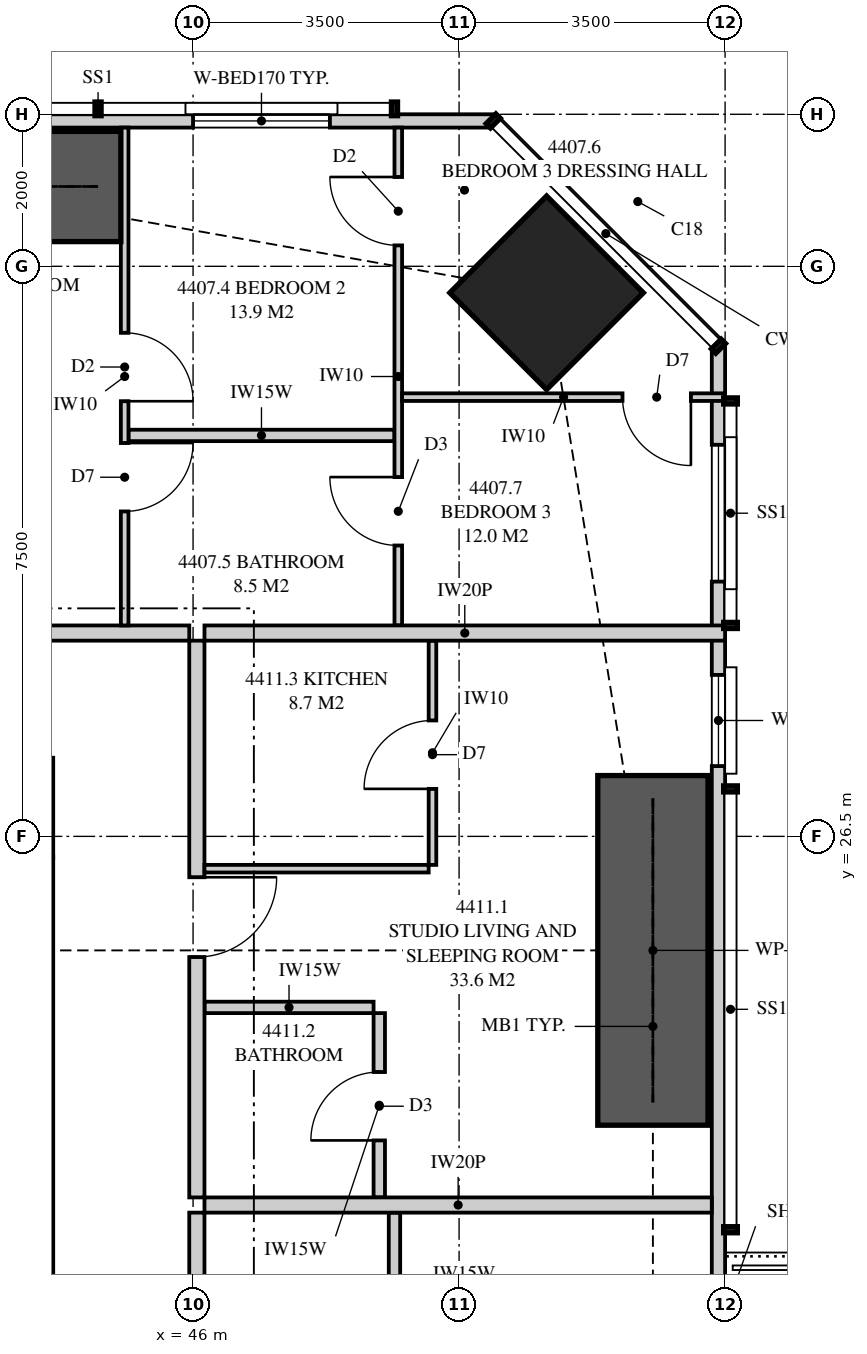
"""IFC4 building model, lengths in metres.
Left out: names, types, materials, properties, quantities, classifications, styles, units other than length and angle.
Written with IfcOpenShell. Run it as: python <this file> out.ifc"""

import sys

from ifc_helpers import new_model, si_unit, direction, frame, frame_2d, origin, origin_2d, place, context, subcontext, project, spatial, polyline, rectangle, outline, extrude, element, fill, save


model = new_model("IFC4")
c1 = context("Model", 3, precision=1e-05, world=origin(), true_north=direction((0.0, 1.0)))
c2 = subcontext(c1, "Body", "Model", "MODEL_VIEW")
j1 = project(units=[si_unit("LENGTHUNIT", "METRE"), si_unit("PLANEANGLEUNIT", "RADIAN")], contexts=[c1])
p1 = place(None, origin())
s1 = spatial("IfcSite", under=j1, at=p1, CompositionType="ELEMENT")
p2 = place(p1, origin())
s2 = spatial("IfcBuilding", under=s1, at=p2, CompositionType="ELEMENT")
p3 = place(p2, frame((0.0, 0.0, 164.4)))
s3 = spatial("IfcBuildingStorey", under=s2, at=p3, CompositionType="ELEMENT", Elevation=164.4)
p4 = place(p3, frame((50.652, 33.652, 0.0), z_axis=(0.0, 0.0, 1.0), x_axis=(0.707106781187, 0.707106781187, 0.0)))
e1 = element("IfcColumn", 1, at=p4, inside=s3, PredefinedType="COLUMN", context=c2, shape_type="SweptSolid", body=[
    extrude(rectangle(XDim=1.8, YDim=1.8, at=origin_2d()), origin(), (0.0, 0.0, 1.0), 3.35),
])
p5 = place(p3, frame((43.8, 19.3, 0.0), z_axis=(0.0, 0.0, 1.0), x_axis=(0.0, 1.0, 0.0)))
e2 = element("IfcWall", 2, at=p5, inside=s3, PredefinedType="SHEAR", context=c2, shape_type="SweptSolid", body=[
    extrude(rectangle(XDim=6.925, YDim=0.7, at=frame_2d((3.462, 0.0))), origin(), (0.0, 0.0, 1.0), 3.35),
])
p6 = place(p3, frame((52.913, 3.051, 0.0), z_axis=(0.0, 0.0, 1.0), x_axis=(0.0, 1.0, 0.0)))
e3 = element("IfcWall", 3, at=p6, inside=s3, PredefinedType="SOLIDWALL", context=c2, shape_type="SweptSolid", body=[
    extrude(outline(polyline([(0.0, 0.0), (29.897, 0.0), (29.897, 3.11), (22.167, 3.11), (22.167, 2.15), (22.074, 2.15), (22.074, 3.11), (21.949, 3.11), (21.949, 2.15), (9.949, 2.15), (9.949, 3.11), (9.847, 3.11), (9.847, 2.15), (9.706, 2.15), (9.706, 3.11), (0.0, 3.11), (0.0, 0.0)])), frame((0.0, 0.087, 0.0), z_axis=(0.0, -1.0, 0.0), x_axis=(1.0, 0.0, 0.0)), (0.0, 0.0, 1.0), 0.175),
])
p7 = place(p6, frame((1.797, 0.0, 0.4)))
e4 = element("IfcOpeningElement", 4, at=p7, cuts=e3, PredefinedType="OPENING", context=c2, shape_type="SweptSolid", body=[
    extrude(rectangle(XDim=1.8, YDim=1.7, at=frame_2d((0.9, 0.85))), frame((0.0, 0.097, 0.0), z_axis=(0.0, -1.0, 0.0), x_axis=(1.0, 0.0, 0.0)), (0.0, 0.0, 1.0), 0.195),
])
p8 = place(p6, frame((5.674, 0.0, 0.4)))
e5 = element("IfcOpeningElement", 5, at=p8, cuts=e3, PredefinedType="OPENING", context=c2, shape_type="SweptSolid", body=[
    extrude(rectangle(XDim=1.8, YDim=1.7, at=frame_2d((0.9, 0.85))), frame((0.0, 0.097, 0.0), z_axis=(0.0, -1.0, 0.0), x_axis=(1.0, 0.0, 0.0)), (0.0, 0.0, 1.0), 0.195),
])
p9 = place(p6, frame((12.349, 0.0, 0.4)))
e6 = element("IfcOpeningElement", 6, at=p9, cuts=e3, PredefinedType="OPENING", context=c2, shape_type="SweptSolid", body=[
    extrude(rectangle(XDim=2.4, YDim=1.7, at=frame_2d((1.2, 0.85))), frame((0.0, 0.097, 0.0), z_axis=(0.0, -1.0, 0.0), x_axis=(1.0, 0.0, 0.0)), (0.0, 0.0, 1.0), 0.195),
])
p10 = place(p6, frame((15.274, 0.0, 0.0)))
e7 = element("IfcOpeningElement", 7, at=p10, cuts=e3, PredefinedType="OPENING", context=c2, shape_type="SweptSolid", body=[
    extrude(rectangle(XDim=1.8, YDim=2.1, at=frame_2d((0.9, 1.05))), frame((0.0, 0.097, 0.0), z_axis=(0.0, -1.0, 0.0), x_axis=(1.0, 0.0, 0.0)), (0.0, 0.0, 1.0), 0.195),
])
p11 = place(p6, frame((24.373, 0.0, 0.4)))
e8 = element("IfcOpeningElement", 8, at=p11, cuts=e3, PredefinedType="OPENING", context=c2, shape_type="SweptSolid", body=[
    extrude(rectangle(XDim=1.2, YDim=1.7, at=frame_2d((0.6, 0.85))), frame((0.0, 0.097, 0.0), z_axis=(0.0, -1.0, 0.0), x_axis=(1.0, 0.0, 0.0)), (0.0, 0.0, 1.0), 0.195),
])
p12 = place(p6, frame((26.801, 0.0, 0.4)))
e9 = element("IfcOpeningElement", 9, at=p12, cuts=e3, PredefinedType="OPENING", context=c2, shape_type="SweptSolid", body=[
    extrude(rectangle(XDim=1.8, YDim=1.7, at=frame_2d((0.9, 0.85))), frame((0.0, 0.097, 0.0), z_axis=(0.0, -1.0, 0.0), x_axis=(1.0, 0.0, 0.0)), (0.0, 0.0, 1.0), 0.195),
])
p13 = place(p3, frame((49.949, 35.913, 0.0), z_axis=(0.0, 0.0, 1.0), x_axis=(-1.0, 0.0, 0.0)))
e10 = element("IfcWall", 10, at=p13, inside=s3, PredefinedType="SOLIDWALL", context=c2, shape_type="SweptSolid", body=[
    extrude(outline(polyline([(0.0, 0.0), (34.897, 0.0), (34.897, 3.11), (27.91, 3.11), (27.91, 2.15), (27.836, 2.15), (27.836, 3.11), (27.699, 3.11), (27.699, 2.15), (7.199, 2.15), (7.199, 3.11), (7.062, 3.11), (7.062, 2.15), (6.987, 2.15), (6.987, 3.11), (0.0, 3.11), (0.0, 0.0)])), frame((0.0, 0.087, 0.0), z_axis=(0.0, -1.0, 0.0), x_axis=(1.0, 0.0, 0.0)), (0.0, 0.0, 1.0), 0.175),
])
p14 = place(p13, frame((2.149, 0.0, 0.4)))
e11 = element("IfcOpeningElement", 11, at=p14, cuts=e10, PredefinedType="OPENING", context=c2, shape_type="SweptSolid", body=[
    extrude(rectangle(XDim=1.8, YDim=1.7, at=frame_2d((0.9, 0.85))), frame((0.0, 0.097, 0.0), z_axis=(0.0, -1.0, 0.0), x_axis=(1.0, 0.0, 0.0)), (0.0, 0.0, 1.0), 0.195),
])
p15 = place(p13, frame((10.299, 0.0, 0.0)))
e12 = element("IfcOpeningElement", 12, at=p15, cuts=e10, PredefinedType="OPENING", context=c2, shape_type="SweptSolid", body=[
    extrude(rectangle(XDim=1.8, YDim=2.1, at=frame_2d((0.9, 1.05))), frame((0.0, 0.097, 0.0), z_axis=(0.0, -1.0, 0.0), x_axis=(1.0, 0.0, 0.0)), (0.0, 0.0, 1.0), 0.195),
])
p16 = place(p13, frame((13.231, 0.0, 0.4)))
e13 = element("IfcOpeningElement", 13, at=p16, cuts=e10, PredefinedType="OPENING", context=c2, shape_type="SweptSolid", body=[
    extrude(rectangle(XDim=1.8, YDim=1.7, at=frame_2d((0.9, 0.85))), frame((0.0, 0.097, 0.0), z_axis=(0.0, -1.0, 0.0), x_axis=(1.0, 0.0, 0.0)), (0.0, 0.0, 1.0), 0.195),
])
p17 = place(p13, frame((22.699, 0.0, 0.0)))
e14 = element("IfcOpeningElement", 14, at=p17, cuts=e10, PredefinedType="OPENING", context=c2, shape_type="SweptSolid", body=[
    extrude(rectangle(XDim=1.8, YDim=2.1, at=frame_2d((0.9, 1.05))), frame((0.0, 0.097, 0.0), z_axis=(0.0, -1.0, 0.0), x_axis=(1.0, 0.0, 0.0)), (0.0, 0.0, 1.0), 0.195),
])
p18 = place(p13, frame((19.853, 0.0, 0.4)))
e15 = element("IfcOpeningElement", 15, at=p18, cuts=e10, PredefinedType="OPENING", context=c2, shape_type="SweptSolid", body=[
    extrude(rectangle(XDim=2.4, YDim=1.7, at=frame_2d((1.2, 0.85))), frame((0.0, 0.097, 0.0), z_axis=(0.0, -1.0, 0.0), x_axis=(1.0, 0.0, 0.0)), (0.0, 0.0, 1.0), 0.195),
])
p19 = place(p13, frame((30.104, 0.0, 0.4)))
e16 = element("IfcOpeningElement", 16, at=p19, cuts=e10, PredefinedType="OPENING", context=c2, shape_type="SweptSolid", body=[
    extrude(rectangle(XDim=2.4, YDim=1.7, at=frame_2d((1.2, 0.85))), frame((0.0, 0.097, 0.0), z_axis=(0.0, -1.0, 0.0), x_axis=(1.0, 0.0, 0.0)), (0.0, 0.0, 1.0), 0.195),
])
p20 = place(p3, frame((45.1, 35.825, 0.0), z_axis=(0.0, 0.0, 1.0), x_axis=(0.0, -1.0, 0.0)))
e17 = element("IfcWall", 17, at=p20, inside=s3, PredefinedType="PARTITIONING", context=c2, shape_type="SweptSolid", body=[
    extrude(outline(polyline([(0.0, 0.0), (6.55, 0.0), (6.55, 3.11), (2.064, 3.11), (2.064, 2.15), (0.318, 2.15), (0.318, 3.11), (0.0, 3.11), (0.0, 0.0)])), frame((0.0, 0.05, 0.0), z_axis=(0.0, -1.0, 0.0), x_axis=(1.0, 0.0, 0.0)), (0.0, 0.0, 1.0), 0.1),
])
p21 = place(p20, frame((2.7, 0.0, 0.0)))
e18 = element("IfcOpeningElement", 18, at=p21, cuts=e17, PredefinedType="OPENING", context=c2, shape_type="SweptSolid", body=[
    extrude(rectangle(XDim=0.9, YDim=2.1, at=frame_2d((0.45, 1.05))), frame((0.0, 0.06, 0.0), z_axis=(0.0, -1.0, 0.0), x_axis=(1.0, 0.0, 0.0)), (0.0, 0.0, 1.0), 0.12),
])
p22 = place(p20, frame((4.15, 0.0, 0.0)))
e19 = element("IfcOpeningElement", 19, at=p22, cuts=e17, PredefinedType="OPENING", context=c2, shape_type="SweptSolid", body=[
    extrude(rectangle(XDim=0.9, YDim=2.1, at=frame_2d((0.45, 1.05))), frame((0.0, 0.06, 0.0), z_axis=(0.0, -1.0, 0.0), x_axis=(1.0, 0.0, 0.0)), (0.0, 0.0, 1.0), 0.12),
])
p23 = place(p3, frame((48.7, 35.825, 0.0), z_axis=(0.0, 0.0, 1.0), x_axis=(0.0, -1.0, 0.0)))
e20 = element("IfcWall", 20, at=p23, inside=s3, PredefinedType="PARTITIONING", context=c2, shape_type="SweptSolid", body=[
    extrude(outline(polyline([(0.0, 0.0), (6.55, 0.0), (6.55, 3.11), (2.701, 3.11), (2.701, 2.15), (0.955, 2.15), (0.955, 3.11), (0.0, 3.11), (0.0, 0.0)])), frame((0.0, 0.05, 0.0), z_axis=(0.0, -1.0, 0.0), x_axis=(1.0, 0.0, 0.0)), (0.0, 0.0, 1.0), 0.1),
])
p24 = place(p23, frame((0.65, 0.0, 0.0)))
e21 = element("IfcOpeningElement", 21, at=p24, cuts=e20, PredefinedType="OPENING", context=c2, shape_type="SweptSolid", body=[
    extrude(rectangle(XDim=0.9, YDim=2.1, at=frame_2d((0.45, 1.05))), frame((0.0, 0.06, 0.0), z_axis=(0.0, -1.0, 0.0), x_axis=(1.0, 0.0, 0.0)), (0.0, 0.0, 1.0), 0.12),
])
p25 = place(p23, frame((4.598, 0.0, 0.0)))
e22 = element("IfcOpeningElement", 22, at=p25, cuts=e20, PredefinedType="OPENING", context=c2, shape_type="SweptSolid", body=[
    extrude(rectangle(XDim=0.9, YDim=2.1, at=frame_2d((0.45, 1.05))), frame((0.0, 0.06, 0.0), z_axis=(0.0, -1.0, 0.0), x_axis=(1.0, 0.0, 0.0)), (0.0, 0.0, 1.0), 0.12),
])
p26 = place(p3, frame((45.15, 31.775, 0.0), z_axis=(0.0, 0.0, 1.0), x_axis=(1.0, 0.0, 0.0)))
e23 = element("IfcWall", 23, at=p26, inside=s3, PredefinedType="PLUMBINGWALL", context=c2, shape_type="SweptSolid", body=[
    extrude(rectangle(XDim=3.5, YDim=0.15, at=frame_2d((1.75, 0.0))), origin(), (0.0, 0.0, 1.0), 3.11),
])
p27 = place(p3, frame((48.75, 32.279, 0.0), z_axis=(0.0, 0.0, 1.0), x_axis=(1.0, 0.0, 0.0)))
e24 = element("IfcWall", 24, at=p27, inside=s3, PredefinedType="PARTITIONING", context=c2, shape_type="SweptSolid", body=[
    extrude(outline(polyline([(0.0, 0.0), (4.25, 0.0), (4.25, 3.11), (2.995, 3.11), (2.995, 2.15), (1.252, 2.15), (1.252, 3.11), (0.0, 3.11), (0.0, 0.0)])), frame((0.0, 0.05, 0.0), z_axis=(0.0, -1.0, 0.0), x_axis=(1.0, 0.0, 0.0)), (0.0, 0.0, 1.0), 0.1),
])
p28 = place(p27, frame((2.9, 0.0, 0.0)))
e25 = element("IfcOpeningElement", 25, at=p28, cuts=e24, PredefinedType="OPENING", context=c2, shape_type="SweptSolid", body=[
    extrude(rectangle(XDim=0.9, YDim=2.1, at=frame_2d((0.45, 1.05))), frame((0.0, 0.06, 0.0), z_axis=(0.0, -1.0, 0.0), x_axis=(1.0, 0.0, 0.0)), (0.0, 0.0, 1.0), 0.12),
])
p29 = place(p3, frame((46.15, 29.175, 0.0), z_axis=(0.0, 0.0, 1.0), x_axis=(1.0, 0.0, 0.0)))
e26 = element("IfcWall", 26, at=p29, inside=s3, PredefinedType="PARTITIONING", context=c2, shape_type="SweptSolid", body=[
    extrude(outline(polyline([(0.0, 0.0), (6.85, 0.0), (6.85, 3.11), (6.147, 3.11), (6.147, 2.15), (4.303, 2.15), (4.303, 3.11), (0.0, 3.11), (0.0, 0.0)])), frame((0.0, 0.1, 0.0), z_axis=(0.0, -1.0, 0.0), x_axis=(1.0, 0.0, 0.0)), (0.0, 0.0, 1.0), 0.2),
])
p30 = place(p3, frame((52.825, 21.65, 0.0), z_axis=(0.0, 0.0, 1.0), x_axis=(-1.0, 0.0, 0.0)))
e27 = element("IfcWall", 27, at=p30, inside=s3, PredefinedType="PARTITIONING", context=c2, shape_type="SweptSolid", body=[
    extrude(outline(polyline([(0.0, 0.0), (6.675, 0.0), (6.675, 3.11), (1.685, 3.11), (1.685, 2.15), (0.0, 2.15), (0.0, 3.11), (0.0, 0.0)])), frame((0.0, 0.1, 0.0), z_axis=(0.0, -1.0, 0.0), x_axis=(1.0, 0.0, 0.0)), (0.0, 0.0, 1.0), 0.2),
])
p31 = place(p3, frame((48.65, 18.1, 0.0), z_axis=(0.0, 0.0, 1.0), x_axis=(0.0, 1.0, 0.0)))
e28 = element("IfcWall", 28, at=p31, inside=s3, PredefinedType="PLUMBINGWALL", context=c2, shape_type="SweptSolid", body=[
    extrude(rectangle(XDim=3.45, YDim=0.15, at=frame_2d((1.725, 0.0))), origin(), (0.0, 0.0, 1.0), 3.11),
])
p32 = place(p3, frame((46.05, 21.75, 0.0), z_axis=(0.0, 0.0, 1.0), x_axis=(0.0, 1.0, 0.0)))
e29 = element("IfcWall", 29, at=p32, inside=s3, PredefinedType="PARTITIONING", context=c2, shape_type="SweptSolid", body=[
    extrude(outline(polyline([(0.0, 0.0), (7.325, 0.0), (7.325, 3.11), (3.587, 3.11), (3.587, 2.541), (2.913, 2.541), (2.913, 3.11), (0.0, 3.11), (0.0, 0.0)])), frame((0.0, 0.1, 0.0), z_axis=(0.0, -1.0, 0.0), x_axis=(1.0, 0.0, 0.0)), (0.0, 0.0, 1.0), 0.2),
])
p33 = place(p32, frame((3.163, 0.0, 0.0)))
e30 = element("IfcOpeningElement", 30, at=p33, cuts=e29, PredefinedType="OPENING", context=c2, shape_type="SweptSolid", body=[
    extrude(rectangle(XDim=1.05, YDim=2.2, at=frame_2d((0.525, 1.1))), frame((0.0, 0.11, 0.0), z_axis=(0.0, -1.0, 0.0), x_axis=(1.0, 0.0, 0.0)), (0.0, 0.0, 1.0), 0.22),
])
p34 = place(p3, frame((48.45, 21.75, 0.0), z_axis=(0.0, 0.0, 1.0), x_axis=(0.0, 1.0, 0.0)))
e31 = element("IfcWall", 31, at=p34, inside=s3, PredefinedType="PLUMBINGWALL", context=c2, shape_type="SweptSolid", body=[
    extrude(rectangle(XDim=2.425, YDim=0.15, at=frame_2d((1.212, 0.0))), origin(), (0.0, 0.0, 1.0), 3.11),
])
p35 = place(p34, frame((0.75, 0.0, 0.0)))
e32 = element("IfcOpeningElement", 32, at=p35, cuts=e31, PredefinedType="OPENING", context=c2, shape_type="SweptSolid", body=[
    extrude(rectangle(XDim=0.9, YDim=2.1, at=frame_2d((0.45, 1.05))), frame((0.0, 0.085, 0.0), z_axis=(0.0, -1.0, 0.0), x_axis=(1.0, 0.0, 0.0)), (0.0, 0.0, 1.0), 0.17),
])
p36 = place(p3, frame((48.375, 24.25, 0.0), z_axis=(0.0, 0.0, 1.0), x_axis=(-1.0, 0.0, 0.0)))
e33 = element("IfcWall", 33, at=p36, inside=s3, PredefinedType="PLUMBINGWALL", context=c2, shape_type="SweptSolid", body=[
    extrude(rectangle(XDim=2.225, YDim=0.15, at=frame_2d((1.113, 0.0))), origin(), (0.0, 0.0, 1.0), 3.11),
])
p37 = place(p3, frame((49.15, 26.125, 0.0), z_axis=(0.0, 0.0, 1.0), x_axis=(0.0, 1.0, 0.0)))
e34 = element("IfcWall", 34, at=p37, inside=s3, PredefinedType="PARTITIONING", context=c2, shape_type="SweptSolid", body=[
    extrude(rectangle(XDim=2.95, YDim=0.1, at=frame_2d((1.475, 0.0))), origin(), (0.0, 0.0, 1.0), 3.11),
])
p38 = place(p37, frame((1.0, 0.0, 0.0)))
e35 = element("IfcOpeningElement", 35, at=p38, cuts=e34, PredefinedType="OPENING", context=c2, shape_type="SweptSolid", body=[
    extrude(rectangle(XDim=0.9, YDim=2.1, at=frame_2d((0.45, 1.05))), frame((0.0, 0.06, 0.0), z_axis=(0.0, -1.0, 0.0), x_axis=(1.0, 0.0, 0.0)), (0.0, 0.0, 1.0), 0.12),
])
p39 = place(p3, frame((49.1, 26.075, 0.0), z_axis=(0.0, 0.0, 1.0), x_axis=(-1.0, 0.0, 0.0)))
e36 = element("IfcWall", 36, at=p39, inside=s3, PredefinedType="PARTITIONING", context=c2, shape_type="SweptSolid", body=[
    extrude(rectangle(XDim=2.95, YDim=0.1, at=frame_2d((1.475, 0.0))), origin(), (0.0, 0.0, 1.0), 3.11),
])
p40 = place(p3, frame((43.75, 29.175, 0.0), z_axis=(0.0, 0.0, 1.0), x_axis=(1.0, 0.0, 0.0)))
e37 = element("IfcWall", 37, at=p40, inside=s3, PredefinedType="PARTITIONING", context=c2, shape_type="SweptSolid", body=[
    extrude(rectangle(XDim=2.2, YDim=0.2, at=frame_2d((1.1, 0.0))), origin(), (0.0, 0.0, 1.0), 3.11),
])
p41 = place(p3, frame((46.05, 16.738, 0.0), z_axis=(0.0, 0.0, 1.0), x_axis=(0.0, 1.0, 0.0)))
e38 = element("IfcWall", 38, at=p41, inside=s3, PredefinedType="PARTITIONING", context=c2, shape_type="SweptSolid", body=[
    extrude(rectangle(XDim=4.812, YDim=0.2, at=frame_2d((2.406, 0.0))), origin(), (0.0, 0.0, 1.0), 3.11),
])
for number, where, z_axis, x_axis in (
    (39, (52.05, 22.7, 0.0), (0.0, 0.0, 1.0), (0.0, 1.0, 0.0)),
    (40, (40.45, 35.05, 0.0), (0.0, 0.0, 1.0), (1.0, 0.0, 0.0)),
):
    element("IfcWall", number, at=place(p3, frame(where, z_axis=z_axis, x_axis=x_axis)), inside=s3, PredefinedType="SHEAR", context=c2, shape_type="SweptSolid", body=[
        extrude(rectangle(XDim=4.6, YDim=1.45, at=frame_2d((2.3, 0.0))), origin(), (0.0, 0.0, 1.0), 3.35),
    ])
p42 = place(p11, origin())
e41 = element("IfcWindow", 41, at=p42, inside=s3, PartitioningType="SINGLE_PANEL", PredefinedType="WINDOW", context=c2, shape_type="SweptSolid", body=[
    extrude(rectangle(XDim=1.2, YDim=1.7, at=frame_2d((0.6, 0.85))), frame((0.0, 0.03, 0.0), z_axis=(0.0, -1.0, 0.0), x_axis=(1.0, 0.0, 0.0)), (0.0, 0.0, 1.0), 0.06),
])
fill(e8, e41)
p43 = place(p12, origin())
e42 = element("IfcWindow", 42, at=p43, inside=s3, PartitioningType="SINGLE_PANEL", PredefinedType="WINDOW", context=c2, shape_type="SweptSolid", body=[
    extrude(rectangle(XDim=1.8, YDim=1.7, at=frame_2d((0.9, 0.85))), frame((0.0, 0.03, 0.0), z_axis=(0.0, -1.0, 0.0), x_axis=(1.0, 0.0, 0.0)), (0.0, 0.0, 1.0), 0.06),
])
fill(e9, e42)
p44 = place(p14, origin())
e43 = element("IfcWindow", 43, at=p44, inside=s3, PartitioningType="SINGLE_PANEL", PredefinedType="WINDOW", context=c2, shape_type="SweptSolid", body=[
    extrude(rectangle(XDim=1.8, YDim=1.7, at=frame_2d((0.9, 0.85))), frame((0.0, 0.03, 0.0), z_axis=(0.0, -1.0, 0.0), x_axis=(1.0, 0.0, 0.0)), (0.0, 0.0, 1.0), 0.06),
])
fill(e11, e43)
p45 = place(p21, origin())
e44 = element("IfcDoor", 44, at=p45, inside=s3, OperationType="SINGLE_SWING_RIGHT", PredefinedType="DOOR", context=c2, shape_type="SweptSolid", body=[
    extrude(rectangle(XDim=0.9, YDim=2.1, at=frame_2d((0.45, 1.05))), frame((0.0, 0.025, 0.0), z_axis=(0.0, -1.0, 0.0), x_axis=(1.0, 0.0, 0.0)), (0.0, 0.0, 1.0), 0.05),
])
fill(e18, e44)
p46 = place(p22, origin())
e45 = element("IfcDoor", 45, at=p46, inside=s3, OperationType="SINGLE_SWING_LEFT", PredefinedType="DOOR", context=c2, shape_type="SweptSolid", body=[
    extrude(rectangle(XDim=0.9, YDim=2.1, at=frame_2d((0.45, 1.05))), frame((0.0, 0.025, 0.0), z_axis=(0.0, -1.0, 0.0), x_axis=(1.0, 0.0, 0.0)), (0.0, 0.0, 1.0), 0.05),
])
fill(e19, e45)
p47 = place(p28, frame((0.9, 0.0, 0.0), z_axis=(0.0, 0.0, 1.0), x_axis=(-1.0, 0.0, 0.0)))
e46 = element("IfcDoor", 46, at=p47, inside=s3, OperationType="SINGLE_SWING_LEFT", PredefinedType="DOOR", context=c2, shape_type="SweptSolid", body=[
    extrude(rectangle(XDim=0.9, YDim=2.1, at=frame_2d((0.45, 1.05))), frame((0.0, 0.025, 0.0), z_axis=(0.0, -1.0, 0.0), x_axis=(1.0, 0.0, 0.0)), (0.0, 0.0, 1.0), 0.05),
])
fill(e25, e46)
p48 = place(p24, frame((0.9, 0.0, 0.0), z_axis=(0.0, 0.0, 1.0), x_axis=(-1.0, 0.0, 0.0)))
e47 = element("IfcDoor", 47, at=p48, inside=s3, OperationType="SINGLE_SWING_RIGHT", PredefinedType="DOOR", context=c2, shape_type="SweptSolid", body=[
    extrude(rectangle(XDim=0.9, YDim=2.1, at=frame_2d((0.45, 1.05))), frame((0.0, 0.025, 0.0), z_axis=(0.0, -1.0, 0.0), x_axis=(1.0, 0.0, 0.0)), (0.0, 0.0, 1.0), 0.05),
])
fill(e21, e47)
p49 = place(p25, frame((0.9, 0.0, 0.0), z_axis=(0.0, 0.0, 1.0), x_axis=(-1.0, 0.0, 0.0)))
e48 = element("IfcDoor", 48, at=p49, inside=s3, OperationType="SINGLE_SWING_RIGHT", PredefinedType="DOOR", context=c2, shape_type="SweptSolid", body=[
    extrude(rectangle(XDim=0.9, YDim=2.1, at=frame_2d((0.45, 1.05))), frame((0.0, 0.025, 0.0), z_axis=(0.0, -1.0, 0.0), x_axis=(1.0, 0.0, 0.0)), (0.0, 0.0, 1.0), 0.05),
])
fill(e22, e48)
p50 = place(p33, frame((1.05, 0.0, 0.0), z_axis=(0.0, 0.0, 1.0), x_axis=(-1.0, 0.0, 0.0)))
e49 = element("IfcDoor", 49, at=p50, inside=s3, OperationType="SINGLE_SWING_LEFT", PredefinedType="DOOR", context=c2, shape_type="SweptSolid", body=[
    extrude(rectangle(XDim=1.05, YDim=2.2, at=frame_2d((0.525, 1.1))), frame((0.0, 0.025, 0.0), z_axis=(0.0, -1.0, 0.0), x_axis=(1.0, 0.0, 0.0)), (0.0, 0.0, 1.0), 0.05),
])
fill(e30, e49)
p51 = place(p35, origin())
e50 = element("IfcDoor", 50, at=p51, inside=s3, OperationType="SINGLE_SWING_LEFT", PredefinedType="DOOR", context=c2, shape_type="SweptSolid", body=[
    extrude(rectangle(XDim=0.9, YDim=2.1, at=frame_2d((0.45, 1.05))), frame((0.0, 0.025, 0.0), z_axis=(0.0, -1.0, 0.0), x_axis=(1.0, 0.0, 0.0)), (0.0, 0.0, 1.0), 0.05),
])
fill(e32, e50)
p52 = place(p38, origin())
e51 = element("IfcDoor", 51, at=p52, inside=s3, OperationType="SINGLE_SWING_LEFT", PredefinedType="DOOR", context=c2, shape_type="SweptSolid", body=[
    extrude(rectangle(XDim=0.9, YDim=2.1, at=frame_2d((0.45, 1.05))), frame((0.0, 0.025, 0.0), z_axis=(0.0, -1.0, 0.0), x_axis=(1.0, 0.0, 0.0)), (0.0, 0.0, 1.0), 0.05),
])
fill(e35, e51)
save(model, sys.argv[1])
